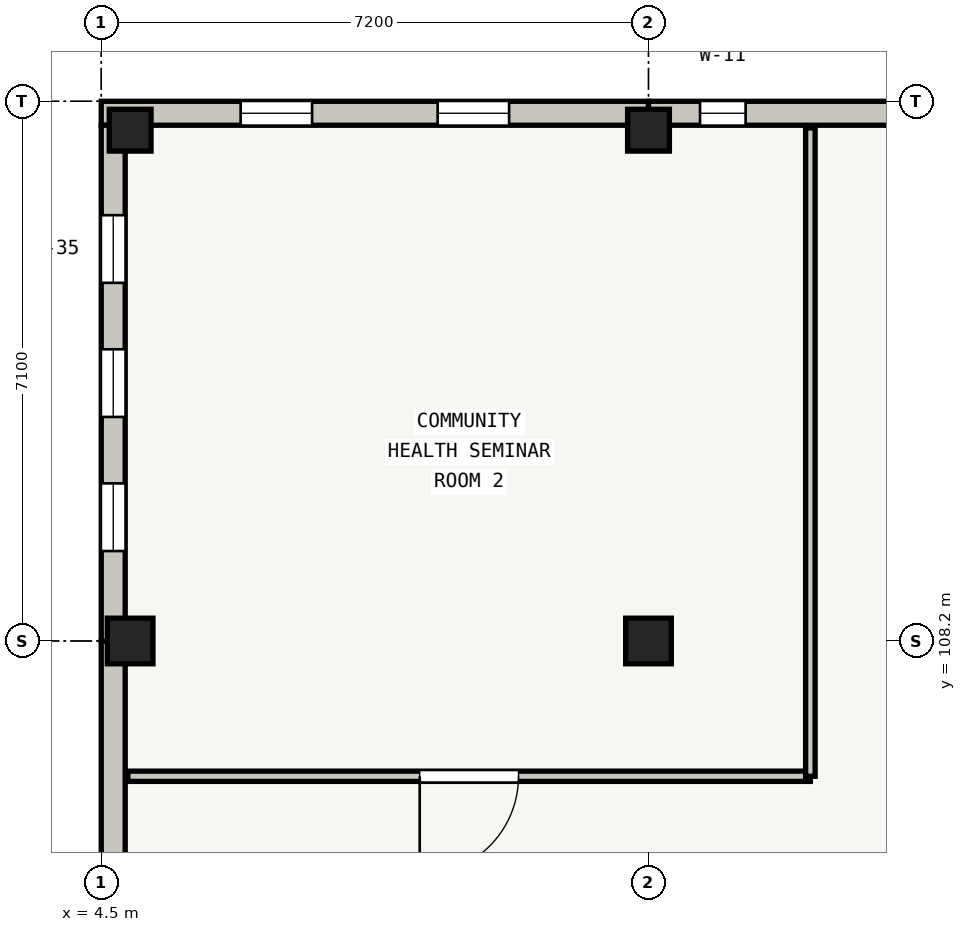
"""IFC4 building model, lengths in metres.
Left out: names, types, materials, properties, quantities, classifications, styles, units other than length and angle.
Written with IfcOpenShell. Run it as: python <this file> out.ifc"""

import sys

from ifc_helpers import new_model, si_unit, direction, frame, frame_2d, origin, origin_2d, place, context, subcontext, project, spatial, rectangle, extrude, element, fill, save


model = new_model("IFC4")
c1 = context("Model", 3, precision=1e-05, world=origin(), true_north=direction((0.0, 1.0)))
c2 = subcontext(c1, "Body", "Model", "MODEL_VIEW")
j1 = project(units=[si_unit("LENGTHUNIT", "METRE"), si_unit("PLANEANGLEUNIT", "RADIAN")], contexts=[c1])
p1 = place(None, origin())
s1 = spatial("IfcSite", under=j1, at=p1, CompositionType="ELEMENT")
p2 = place(p1, origin())
s2 = spatial("IfcBuilding", under=s1, at=p2, CompositionType="ELEMENT")
p3 = place(p2, frame((0.0, 0.0, 4.5)))
s3 = spatial("IfcBuildingStorey", under=s2, at=p3, CompositionType="ELEMENT", Elevation=4.5)
p4 = place(p3, frame((4.88, 108.2, 0.0), z_axis=(0.0, 0.0, 1.0), x_axis=(1.0, 0.0, 0.0)))
e1 = element("IfcColumn", 1, at=p4, inside=s3, PredefinedType="COLUMN", context=c2, shape_type="SweptSolid", body=[
    extrude(rectangle(XDim=0.6, YDim=0.6, at=origin_2d()), origin(), (0.0, 0.0, 1.0), 3.935),
])
p5 = place(p3, frame((4.88, 114.92, 0.0), z_axis=(0.0, 0.0, 1.0), x_axis=(1.0, 0.0, 0.0)))
e2 = element("IfcColumn", 2, at=p5, inside=s3, PredefinedType="COLUMN", context=c2, shape_type="SweptSolid", body=[
    extrude(rectangle(XDim=0.55, YDim=0.55, at=origin_2d()), origin(), (0.0, 0.0, 1.0), 3.935),
])
p6 = place(p3, frame((11.7, 108.2, 0.0), z_axis=(0.0, 0.0, 1.0), x_axis=(1.0, 0.0, 0.0)))
e3 = element("IfcColumn", 3, at=p6, inside=s3, PredefinedType="COLUMN", context=c2, shape_type="SweptSolid", body=[
    extrude(rectangle(XDim=0.6, YDim=0.6, at=origin_2d()), origin(), (0.0, 0.0, 1.0), 3.935),
])
p7 = place(p3, frame((11.7, 114.92, 0.0), z_axis=(0.0, 0.0, 1.0), x_axis=(1.0, 0.0, 0.0)))
e4 = element("IfcColumn", 4, at=p7, inside=s3, PredefinedType="COLUMN", context=c2, shape_type="SweptSolid", body=[
    extrude(rectangle(XDim=0.55, YDim=0.55, at=origin_2d()), origin(), (0.0, 0.0, 1.0), 3.935),
])
p8 = place(p3, frame((4.5, 115.143, 0.0), z_axis=(0.0, 0.0, 1.0), x_axis=(1.0, 0.0, 0.0)))
e5 = element("IfcWall", 5, at=p8, inside=s3, PredefinedType="SOLIDWALL", context=c2, shape_type="SweptSolid", body=[
    extrude(rectangle(XDim=7.2, YDim=0.315, at=frame_2d((3.6, 0.0))), origin(), (0.0, 0.0, 1.0), 3.3),
])
p9 = place(p8, frame((1.834, 0.0, 0.55)))
e6 = element("IfcOpeningElement", 6, at=p9, cuts=e5, PredefinedType="OPENING", context=c2, shape_type="SweptSolid", body=[
    extrude(rectangle(XDim=0.94, YDim=2.18, at=frame_2d((0.47, 1.09))), frame((0.0, 0.157, 0.0), z_axis=(0.0, -1.0, 0.0), x_axis=(1.0, 0.0, 0.0)), (0.0, 0.0, 1.0), 0.315),
])
p10 = place(p8, frame((4.426, 0.0, 0.55)))
e7 = element("IfcOpeningElement", 7, at=p10, cuts=e5, PredefinedType="OPENING", context=c2, shape_type="SweptSolid", body=[
    extrude(rectangle(XDim=0.94, YDim=2.18, at=frame_2d((0.47, 1.09))), frame((0.0, 0.157, 0.0), z_axis=(0.0, -1.0, 0.0), x_axis=(1.0, 0.0, 0.0)), (0.0, 0.0, 1.0), 0.315),
])
p11 = place(p3, frame((11.7, 115.143, 0.0), z_axis=(0.0, 0.0, 1.0), x_axis=(1.0, 0.0, 0.0)))
e8 = element("IfcWall", 8, at=p11, inside=s3, PredefinedType="SOLIDWALL", context=c2, shape_type="SweptSolid", body=[
    extrude(rectangle(XDim=7.2, YDim=0.315, at=frame_2d((3.6, 0.0))), origin(), (0.0, 0.0, 1.0), 3.3),
])
p12 = place(p11, frame((0.678, 0.0, 0.55)))
e9 = element("IfcOpeningElement", 9, at=p12, cuts=e8, PredefinedType="OPENING", context=c2, shape_type="SweptSolid", body=[
    extrude(rectangle(XDim=0.6, YDim=2.28, at=frame_2d((0.3, 1.14))), frame((0.0, 0.157, 0.0), z_axis=(0.0, -1.0, 0.0), x_axis=(1.0, 0.0, 0.0)), (0.0, 0.0, 1.0), 0.315),
])
p13 = place(p11, frame((3.3, 0.0, 0.55)))
e10 = element("IfcOpeningElement", 10, at=p13, cuts=e8, PredefinedType="OPENING", context=c2, shape_type="SweptSolid", body=[
    extrude(rectangle(XDim=0.6, YDim=2.28, at=frame_2d((0.3, 1.14))), frame((0.0, 0.157, 0.0), z_axis=(0.0, -1.0, 0.0), x_axis=(1.0, 0.0, 0.0)), (0.0, 0.0, 1.0), 0.315),
])
p14 = place(p11, frame((5.922, 0.0, 0.55)))
e11 = element("IfcOpeningElement", 11, at=p14, cuts=e8, PredefinedType="OPENING", context=c2, shape_type="SweptSolid", body=[
    extrude(rectangle(XDim=0.6, YDim=2.28, at=frame_2d((0.3, 1.14))), frame((0.0, 0.157, 0.0), z_axis=(0.0, -1.0, 0.0), x_axis=(1.0, 0.0, 0.0)), (0.0, 0.0, 1.0), 0.315),
])
p15 = place(p3, frame((4.657, 101.48, 0.0), z_axis=(0.0, 0.0, 1.0), x_axis=(0.0, 1.0, 0.0)))
e12 = element("IfcWall", 12, at=p15, inside=s3, PredefinedType="SOLIDWALL", context=c2, shape_type="SweptSolid", body=[
    extrude(rectangle(XDim=6.72, YDim=0.315, at=frame_2d((3.36, 0.0))), origin(), (0.0, 0.0, 1.0), 3.32),
])
p16 = place(p15, frame((2.945, 0.0, 0.55)))
e13 = element("IfcOpeningElement", 13, at=p16, cuts=e12, PredefinedType="OPENING", context=c2, shape_type="SweptSolid", body=[
    extrude(rectangle(XDim=0.83, YDim=2.06, at=frame_2d((0.415, 1.03))), frame((0.0, 0.157, 0.0), z_axis=(0.0, -1.0, 0.0), x_axis=(1.0, 0.0, 0.0)), (0.0, 0.0, 1.0), 0.315),
])
p17 = place(p3, frame((4.657, 108.2, 0.0), z_axis=(0.0, 0.0, 1.0), x_axis=(0.0, 1.0, 0.0)))
e14 = element("IfcWall", 14, at=p17, inside=s3, PredefinedType="SOLIDWALL", context=c2, shape_type="SweptSolid", body=[
    extrude(rectangle(XDim=6.785, YDim=0.315, at=frame_2d((3.393, 0.0))), origin(), (0.0, 0.0, 1.0), 3.34),
])
p18 = place(p17, frame((1.183, 0.0, 0.55)))
e15 = element("IfcOpeningElement", 15, at=p18, cuts=e14, PredefinedType="OPENING", context=c2, shape_type="SweptSolid", body=[
    extrude(rectangle(XDim=0.89, YDim=2.02, at=frame_2d((0.445, 1.01))), frame((0.0, 0.157, 0.0), z_axis=(0.0, -1.0, 0.0), x_axis=(1.0, 0.0, 0.0)), (0.0, 0.0, 1.0), 0.315),
])
p19 = place(p17, frame((2.948, 0.0, 0.55)))
e16 = element("IfcOpeningElement", 16, at=p19, cuts=e14, PredefinedType="OPENING", context=c2, shape_type="SweptSolid", body=[
    extrude(rectangle(XDim=0.89, YDim=2.02, at=frame_2d((0.445, 1.01))), frame((0.0, 0.157, 0.0), z_axis=(0.0, -1.0, 0.0), x_axis=(1.0, 0.0, 0.0)), (0.0, 0.0, 1.0), 0.315),
])
p20 = place(p17, frame((4.712, 0.0, 0.55)))
e17 = element("IfcOpeningElement", 17, at=p20, cuts=e14, PredefinedType="OPENING", context=c2, shape_type="SweptSolid", body=[
    extrude(rectangle(XDim=0.89, YDim=2.02, at=frame_2d((0.445, 1.01))), frame((0.0, 0.157, 0.0), z_axis=(0.0, -1.0, 0.0), x_axis=(1.0, 0.0, 0.0)), (0.0, 0.0, 1.0), 0.315),
])
p21 = place(p3, frame((13.83, 106.42, 0.0), z_axis=(0.0, 0.0, 1.0), x_axis=(-1.0, 0.0, 0.0)))
e18 = element("IfcWall", 18, at=p21, inside=s3, PredefinedType="MOVABLE", context=c2, shape_type="SweptSolid", body=[
    extrude(rectangle(XDim=8.98, YDim=0.135, at=frame_2d((4.49, 0.0))), origin(), (0.0, 0.0, 1.0), 2.955),
])
p22 = place(p21, frame((3.84, 0.0, 0.0)))
e19 = element("IfcOpeningElement", 19, at=p22, cuts=e18, PredefinedType="OPENING", context=c2, shape_type="SweptSolid", body=[
    extrude(rectangle(XDim=1.3, YDim=2.1, at=frame_2d((0.65, 1.05))), frame((0.0, 0.067, 0.0), z_axis=(0.0, -1.0, 0.0), x_axis=(1.0, 0.0, 0.0)), (0.0, 0.0, 1.0), 0.135),
])
p23 = place(p3, frame((13.83, 114.95, 0.0), z_axis=(0.0, 0.0, 1.0), x_axis=(0.0, -1.0, 0.0)))
e20 = element("IfcWall", 20, at=p23, inside=s3, PredefinedType="PARTITIONING", context=c2, shape_type="SweptSolid", body=[
    extrude(rectangle(XDim=8.53, YDim=0.125, at=frame_2d((4.265, 0.0))), origin(), (0.0, 0.0, 1.0), 2.955),
])
p24 = place(p9, origin())
e21 = element("IfcWindow", 21, at=p24, inside=s3, PartitioningType="DOUBLE_PANEL_VERTICAL", PredefinedType="WINDOW", context=c2, shape_type="SweptSolid", body=[
    extrude(rectangle(XDim=0.94, YDim=2.18, at=frame_2d((0.47, 1.09))), frame((0.0, 0.03, 0.0), z_axis=(0.0, -1.0, 0.0), x_axis=(1.0, 0.0, 0.0)), (0.0, 0.0, 1.0), 0.06),
])
fill(e6, e21)
p25 = place(p10, origin())
e22 = element("IfcWindow", 22, at=p25, inside=s3, PartitioningType="DOUBLE_PANEL_VERTICAL", PredefinedType="WINDOW", context=c2, shape_type="SweptSolid", body=[
    extrude(rectangle(XDim=0.94, YDim=2.18, at=frame_2d((0.47, 1.09))), frame((0.0, 0.03, 0.0), z_axis=(0.0, -1.0, 0.0), x_axis=(1.0, 0.0, 0.0)), (0.0, 0.0, 1.0), 0.06),
])
fill(e7, e22)
p26 = place(p12, origin())
e23 = element("IfcWindow", 23, at=p26, inside=s3, PartitioningType="SINGLE_PANEL", PredefinedType="WINDOW", context=c2, shape_type="SweptSolid", body=[
    extrude(rectangle(XDim=0.6, YDim=2.28, at=frame_2d((0.3, 1.14))), frame((0.0, 0.03, 0.0), z_axis=(0.0, -1.0, 0.0), x_axis=(1.0, 0.0, 0.0)), (0.0, 0.0, 1.0), 0.06),
])
fill(e9, e23)
p27 = place(p18, origin())
e24 = element("IfcWindow", 24, at=p27, inside=s3, PartitioningType="DOUBLE_PANEL_VERTICAL", PredefinedType="WINDOW", context=c2, shape_type="SweptSolid", body=[
    extrude(rectangle(XDim=0.89, YDim=2.02, at=frame_2d((0.445, 1.01))), frame((0.0, 0.03, 0.0), z_axis=(0.0, -1.0, 0.0), x_axis=(1.0, 0.0, 0.0)), (0.0, 0.0, 1.0), 0.06),
])
fill(e15, e24)
p28 = place(p19, origin())
e25 = element("IfcWindow", 25, at=p28, inside=s3, PartitioningType="DOUBLE_PANEL_VERTICAL", PredefinedType="WINDOW", context=c2, shape_type="SweptSolid", body=[
    extrude(rectangle(XDim=0.89, YDim=2.02, at=frame_2d((0.445, 1.01))), frame((0.0, 0.03, 0.0), z_axis=(0.0, -1.0, 0.0), x_axis=(1.0, 0.0, 0.0)), (0.0, 0.0, 1.0), 0.06),
])
fill(e16, e25)
p29 = place(p20, origin())
e26 = element("IfcWindow", 26, at=p29, inside=s3, PartitioningType="DOUBLE_PANEL_VERTICAL", PredefinedType="WINDOW", context=c2, shape_type="SweptSolid", body=[
    extrude(rectangle(XDim=0.89, YDim=2.02, at=frame_2d((0.445, 1.01))), frame((0.0, 0.03, 0.0), z_axis=(0.0, -1.0, 0.0), x_axis=(1.0, 0.0, 0.0)), (0.0, 0.0, 1.0), 0.06),
])
fill(e17, e26)
p30 = place(p22, origin())
e27 = element("IfcDoor", 27, at=p30, inside=s3, OperationType="SINGLE_SWING_RIGHT", PredefinedType="DOOR", context=c2, shape_type="SweptSolid", body=[
    extrude(rectangle(XDim=1.3, YDim=2.1, at=frame_2d((0.65, 1.05))), frame((0.0, 0.025, 0.0), z_axis=(0.0, -1.0, 0.0), x_axis=(1.0, 0.0, 0.0)), (0.0, 0.0, 1.0), 0.05),
])
fill(e19, e27)
save(model, sys.argv[1])
